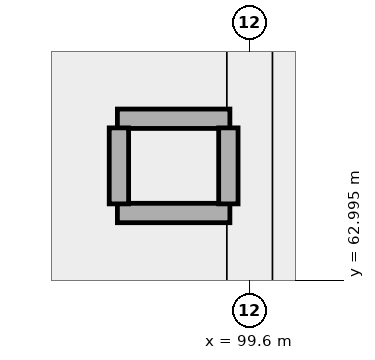
"""IFC4 building model, lengths in metres.
Left out: names, types, materials, properties, quantities, classifications, styles, units other than length and angle.
Written with IfcOpenShell. Run it as: python <this file> out.ifc"""

import sys

from ifc_helpers import new_model, si_unit, direction, frame, frame_2d, origin, place, context, subcontext, project, spatial, rectangle, extrude, element, save


model = new_model("IFC4")
c1 = context("Model", 3, precision=1e-05, world=origin(), true_north=direction((0.0, 1.0)))
c2 = subcontext(c1, "Body", "Model", "MODEL_VIEW")
j1 = project(units=[si_unit("LENGTHUNIT", "METRE"), si_unit("PLANEANGLEUNIT", "RADIAN")], contexts=[c1])
p1 = place(None, origin())
s1 = spatial("IfcSite", under=j1, at=p1, CompositionType="ELEMENT")
p2 = place(p1, origin())
s2 = spatial("IfcBuilding", under=s1, at=p2, CompositionType="ELEMENT")
p3 = place(p2, frame((0.0, 0.0, 20.7)))
s3 = spatial("IfcBuildingStorey", under=s2, at=p3, CompositionType="ELEMENT", Elevation=20.7)
for number, where, z_axis, x_axis in (
    (1, (97.86, 65.12, 0.0), (0.0, 0.0, 1.0), (1.0, 0.0, 0.0)),
    (2, (97.86, 63.88, 0.0), (0.0, 0.0, 1.0), (1.0, 0.0, 0.0)),
):
    element("IfcWall", number, at=place(p3, frame(where, z_axis=z_axis, x_axis=x_axis)), inside=s3, PredefinedType="PARTITIONING", context=c2, shape_type="SweptSolid", body=[
        extrude(rectangle(XDim=1.48, YDim=0.255, at=frame_2d((0.74, 0.0))), origin(), (0.0, 0.0, 1.0), 4.98),
    ])
for number, where, z_axis, x_axis in (
    (3, (97.88, 64.0, 0.0), (0.0, 0.0, 1.0), (0.0, 1.0, 0.0)),
    (4, (99.32, 64.0, 0.0), (0.0, 0.0, 1.0), (0.0, 1.0, 0.0)),
):
    element("IfcWall", number, at=place(p3, frame(where, z_axis=z_axis, x_axis=x_axis)), inside=s3, PredefinedType="PARTITIONING", context=c2, shape_type="SweptSolid", body=[
        extrude(rectangle(XDim=1.0, YDim=0.255, at=frame_2d((0.5, 0.0))), origin(), (0.0, 0.0, 1.0), 4.98),
    ])
save(model, sys.argv[1])
